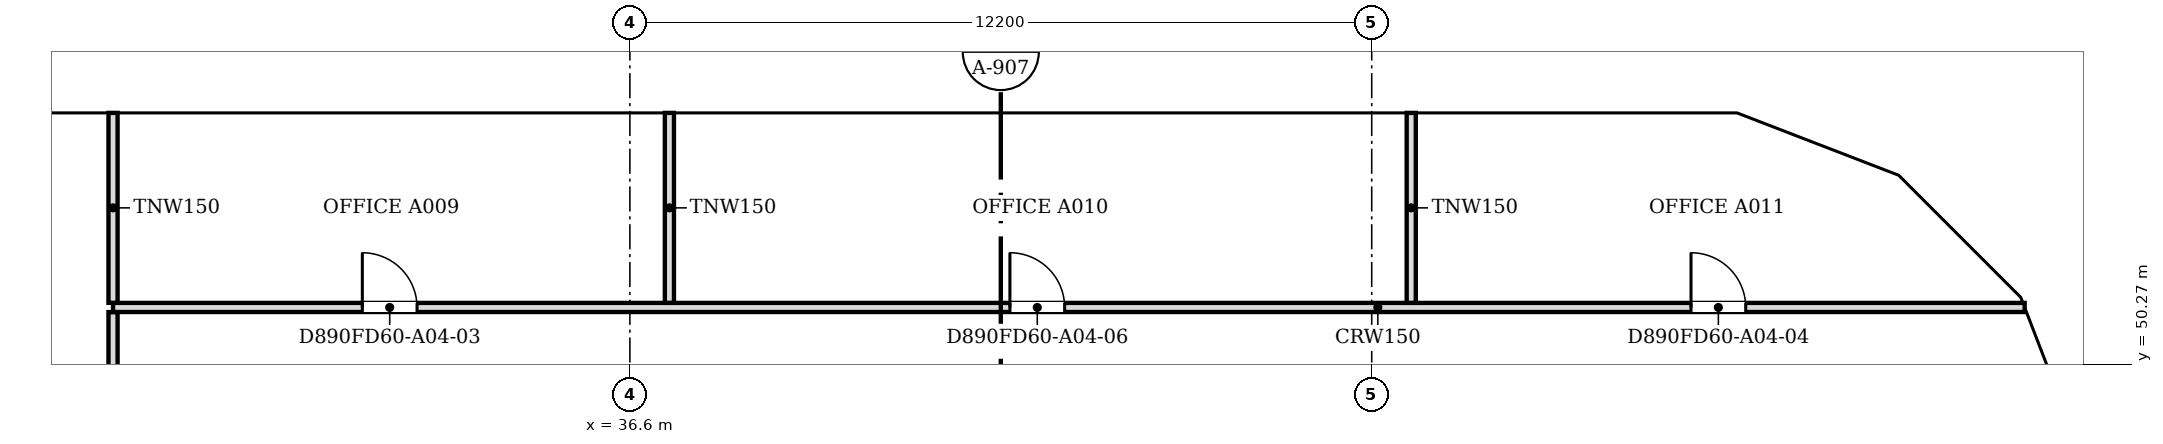
"""IFC4 building model, lengths in metres.
Left out: names, types, materials, properties, quantities, classifications, styles, units other than length and angle.
Written with IfcOpenShell. Run it as: python <this file> out.ifc"""

import sys

from ifc_helpers import new_model, si_unit, direction, frame, frame_2d, origin, place, context, subcontext, project, spatial, polyline, rectangle, outline, extrude, faceted_brep, source, transform, mapped, element, fill, save


model = new_model("IFC4")
c1 = context("Model", 3, precision=1e-05, world=origin(), true_north=direction((0.0, 1.0)))
c2 = subcontext(c1, "Body", "Model", "MODEL_VIEW")
j1 = project(units=[si_unit("LENGTHUNIT", "METRE"), si_unit("PLANEANGLEUNIT", "RADIAN")], contexts=[c1])
p1 = place(None, origin())
s1 = spatial("IfcSite", under=j1, at=p1, CompositionType="ELEMENT")
p2 = place(p1, origin())
s2 = spatial("IfcBuilding", under=s1, at=p2, CompositionType="ELEMENT")
p3 = place(p2, frame((0.0, 0.0, 52.4)))
s3 = spatial("IfcBuildingStorey", under=s2, at=p3, CompositionType="ELEMENT", Elevation=52.4)
m1 = source(origin(), c2, "Body", "Brep", [
    faceted_brep([(0.047, -0.25, 0.0), (2.997, -0.25, 3.8), (0.047, -0.25, 7.6), (0.0, -0.25, 7.541), (0.0, -0.25, 0.059), (0.093, 0.25, 7.54), (2.944, 0.25, 3.868), (2.944, 0.25, 3.732), (0.093, 0.25, 0.06), (2.997, 0.0, 3.8), (0.047, 0.0, 0.0), (0.047, 0.0, 7.6)], [[[0, 1, 2, 3, 4]], [[5, 6, 7, 8]], [[8, 7, 9, 1, 0, 10]], [[6, 5, 11, 2, 1, 9]], [[3, 2, 11]], [[10, 0, 4]], [[8, 10, 4, 3, 11, 5]], [[9, 7, 6]]]),
])
p4 = place(p3, frame((60.767, 48.71, -3.8), z_axis=(0.0, 0.0, 1.0), x_axis=(-0.359901446078, 0.932990326376, 0.0)))
e1 = element("IfcWall", 1, at=p4, inside=s3, PredefinedType="SOLIDWALL", context=c2, shape_type="MappedRepresentation", body=[
    mapped(m1, transform((0.0, 0.0, 0.0), scale=1.0)),
])
m2 = source(origin(), c2, "Body", "SweptSolid", [
    extrude(outline(polyline([(0.247, 0.665), (2.681, 3.8), (0.247, 6.935), (0.247, 0.665)])), frame((0.0, 0.26, 0.0), z_axis=(0.0, -1.0, 0.0), x_axis=(1.0, 0.0, 0.0)), (0.0, 0.0, 1.0), 0.52),
])
p5 = place(p4, origin())
e2 = element("IfcOpeningElement", 2, at=p5, cuts=e1, PredefinedType="OPENING", context=c2, shape_type="MappedRepresentation", body=[
    mapped(m2, transform((0.0, 0.0, 0.0), scale=1.0)),
])
m3 = source(origin(), c2, "Body", "Brep", [
    faceted_brep([(2.944, -0.25, 0.0), (2.997, -0.25, 0.068), (2.997, -0.25, 7.532), (2.944, -0.25, 7.6), (0.0, -0.25, 3.8), (0.053, 0.25, 3.868), (2.891, 0.25, 7.532), (2.891, 0.25, 0.068), (0.053, 0.25, 3.731), (2.944, 0.0, 0.0), (2.944, 0.0, 7.6), (0.0, 0.0, 3.8)], [[[0, 1, 2, 3, 4]], [[5, 6, 7, 8]], [[1, 0, 9]], [[10, 3, 2]], [[6, 5, 11, 4, 3, 10]], [[8, 7, 9, 0, 4, 11]], [[8, 11, 5]], [[1, 9, 7, 6, 10, 2]]]),
])
p6 = place(p3, frame((59.688, 51.506, -3.8), z_axis=(0.0, 0.0, 1.0), x_axis=(-0.707106781187, 0.707106781187, 0.0)))
e3 = element("IfcWall", 3, at=p6, inside=s3, PredefinedType="SOLIDWALL", context=c2, shape_type="MappedRepresentation", body=[
    mapped(m3, transform((0.0, 0.0, 0.0), scale=1.0)),
])
m4 = source(origin(), c2, "Body", "SweptSolid", [
    extrude(outline(polyline([(2.744, 6.934), (0.316, 3.8), (2.744, 0.666), (2.744, 6.934)])), frame((0.0, 0.26, 0.0), z_axis=(0.0, -1.0, 0.0), x_axis=(1.0, 0.0, 0.0)), (0.0, 0.0, 1.0), 0.52),
])
p7 = place(p6, origin())
e4 = element("IfcOpeningElement", 4, at=p7, cuts=e3, PredefinedType="OPENING", context=c2, shape_type="MappedRepresentation", body=[
    mapped(m4, transform((0.0, 0.0, 0.0), scale=1.0)),
])
m5 = source(origin(), c2, "Body", "Brep", [
    faceted_brep([(0.053, -0.25, 0.0), (3.003, -0.25, 3.8), (0.053, -0.25, 7.6), (0.0, -0.25, 7.531), (0.0, -0.25, 0.068), (0.106, 0.25, 7.532), (2.957, 0.25, 3.86), (2.957, 0.25, 3.74), (0.106, 0.25, 0.068), (3.003, 0.0, 3.8), (0.053, 0.0, 0.0), (0.053, 0.0, 7.6)], [[[0, 1, 2, 3, 4]], [[5, 6, 7, 8]], [[8, 7, 9, 1, 0, 10]], [[6, 5, 11, 2, 1, 9]], [[3, 2, 11]], [[10, 0, 4]], [[8, 10, 4, 3, 11, 5]], [[9, 7, 6]]]),
])
p8 = place(p3, frame((57.656, 53.569, -3.8), z_axis=(0.0, 0.0, 1.0), x_axis=(-0.933007896601, 0.359855894603, 0.0)))
e5 = element("IfcWall", 5, at=p8, inside=s3, PredefinedType="SOLIDWALL", context=c2, shape_type="MappedRepresentation", body=[
    mapped(m5, transform((0.0, 0.0, 0.0), scale=1.0)),
])
m6 = source(origin(), c2, "Body", "SweptSolid", [
    extrude(outline(polyline([(0.253, 0.665), (2.687, 3.8), (0.253, 6.935), (0.253, 0.665)])), frame((0.0, 0.26, 0.0), z_axis=(0.0, -1.0, 0.0), x_axis=(1.0, 0.0, 0.0)), (0.0, 0.0, 1.0), 0.52),
])
p9 = place(p8, origin())
e6 = element("IfcOpeningElement", 6, at=p9, cuts=e5, PredefinedType="OPENING", context=c2, shape_type="MappedRepresentation", body=[
    mapped(m6, transform((0.0, 0.0, 0.0), scale=1.0)),
])
m7 = source(origin(), c2, "Body", "Brep", [
    faceted_brep([(3.003, -0.25, 0.0), (6.053, -0.25, 3.8), (3.003, -0.25, 7.6), (0.0, -0.25, 3.8), (0.047, 0.25, 3.859), (3.003, 0.25, 7.6), (6.053, 0.25, 3.8), (3.003, 0.25, 0.0), (0.047, 0.25, 3.741), (0.0, 0.0, 3.8)], [[[0, 1, 2, 3]], [[4, 5, 6, 7, 8]], [[7, 6, 1, 0]], [[6, 5, 2, 1]], [[5, 4, 9, 3, 2]], [[8, 7, 0, 3, 9]], [[8, 9, 4]]]),
])
p10 = place(p3, frame((54.854, 54.65, -3.8), z_axis=(0.0, 0.0, 1.0), x_axis=(-1.0, 0.0, 0.0)))
e7 = element("IfcWall", 7, at=p10, inside=s3, PredefinedType="SOLIDWALL", context=c2, shape_type="MappedRepresentation", body=[
    mapped(m7, transform((0.0, 0.0, 0.0), scale=1.0)),
])
m8 = source(origin(), c2, "Body", "SweptSolid", [
    extrude(outline(polyline([(3.005, 0.401), (5.733, 3.8), (3.005, 7.199), (0.319, 3.8), (3.005, 0.401)])), frame((0.0, 0.26, 0.0), z_axis=(0.0, -1.0, 0.0), x_axis=(1.0, 0.0, 0.0)), (0.0, 0.0, 1.0), 0.52),
])
p11 = place(p10, origin())
e8 = element("IfcOpeningElement", 8, at=p11, cuts=e7, PredefinedType="OPENING", context=c2, shape_type="MappedRepresentation", body=[
    mapped(m8, transform((0.0, 0.0, 0.0), scale=1.0)),
])
m9 = source(origin(), c2, "Body", "SweptSolid", [
    extrude(outline(polyline([(3.05, 0.0), (6.1, 3.8), (3.05, 7.6), (0.0, 3.8), (3.05, 0.0)])), frame((0.0, 0.25, 0.0), z_axis=(0.0, -1.0, 0.0), x_axis=(1.0, 0.0, 0.0)), (0.0, 0.0, 1.0), 0.5),
])
p12 = place(p3, frame((48.8, 54.65, -3.8), z_axis=(0.0, 0.0, 1.0), x_axis=(-1.0, 0.0, 0.0)))
e9 = element("IfcWall", 9, at=p12, inside=s3, PredefinedType="SOLIDWALL", context=c2, shape_type="MappedRepresentation", body=[
    mapped(m9, transform((0.0, 0.0, 0.0), scale=1.0)),
])
m10 = source(origin(), c2, "Body", "SweptSolid", [
    extrude(outline(polyline([(3.05, 0.399), (5.78, 3.8), (3.05, 7.2), (0.321, 3.8), (3.05, 0.399)])), frame((0.0, 0.26, 0.0), z_axis=(0.0, -1.0, 0.0), x_axis=(1.0, 0.0, 0.0)), (0.0, 0.0, 1.0), 0.52),
])
p13 = place(p12, origin())
e10 = element("IfcOpeningElement", 10, at=p13, cuts=e9, PredefinedType="OPENING", context=c2, shape_type="MappedRepresentation", body=[
    mapped(m10, transform((0.0, 0.0, 0.0), scale=1.0)),
])
m11 = source(origin(), c2, "Body", "Brep", [
    faceted_brep([(3.05, -0.25, 0.0), (6.1, -0.25, 3.8), (6.1, -0.25, 3.8), (3.05, -0.25, 7.6), (0.0, -0.25, 3.8), (0.0, 0.25, 3.8), (3.05, 0.25, 7.6), (6.1, 0.25, 3.8), (6.1, 0.25, 3.8), (3.05, 0.25, 0.0)], [[[0, 1, 2, 3, 4]], [[5, 6, 7, 8, 9]], [[9, 8, 1, 0]], [[7, 6, 3, 2]], [[6, 5, 4, 3]], [[5, 9, 0, 4]], [[1, 8, 7, 2]]]),
])
p14 = place(p3, frame((42.7, 54.65, -3.8), z_axis=(0.0, 0.0, 1.0), x_axis=(-1.0, 0.0, 0.0)))
e11 = element("IfcWall", 11, at=p14, inside=s3, PredefinedType="SOLIDWALL", context=c2, shape_type="MappedRepresentation", body=[
    mapped(m11, transform((0.0, 0.0, 0.0), scale=1.0)),
])
p15 = place(p14, origin())
e12 = element("IfcOpeningElement", 12, at=p15, cuts=e11, PredefinedType="OPENING", context=c2, shape_type="MappedRepresentation", body=[
    mapped(m10, transform((0.0, 0.0, 0.0), scale=1.0)),
])
p16 = place(p3, frame((36.6, 54.65, -3.8), z_axis=(0.0, 0.0, 1.0), x_axis=(-1.0, 0.0, 0.0)))
e13 = element("IfcWall", 13, at=p16, inside=s3, PredefinedType="SOLIDWALL", context=c2, shape_type="MappedRepresentation", body=[
    mapped(m9, transform((0.0, 0.0, 0.0), scale=1.0)),
])
p17 = place(p16, origin())
e14 = element("IfcOpeningElement", 14, at=p17, cuts=e13, PredefinedType="OPENING", context=c2, shape_type="MappedRepresentation", body=[
    mapped(m10, transform((0.0, 0.0, 0.0), scale=1.0)),
])
p18 = place(p3, frame((30.5, 54.65, -3.8), z_axis=(0.0, 0.0, 1.0), x_axis=(-1.0, 0.0, 0.0)))
e15 = element("IfcWall", 15, at=p18, inside=s3, PredefinedType="SOLIDWALL", context=c2, shape_type="MappedRepresentation", body=[
    mapped(m9, transform((0.0, 0.0, 0.0), scale=1.0)),
])
p19 = place(p18, origin())
e16 = element("IfcOpeningElement", 16, at=p19, cuts=e15, PredefinedType="OPENING", context=c2, shape_type="MappedRepresentation", body=[
    mapped(m10, transform((0.0, 0.0, 0.0), scale=1.0)),
])
p20 = place(p2, frame((0.0, 0.0, 56.2)))
s4 = spatial("IfcBuildingStorey", under=s2, at=p20, CompositionType="ELEMENT", Elevation=56.2)
m12 = source(origin(), c2, "Body", "Brep", [
    faceted_brep([(2.95, -0.25, 0.0), (3.003, -0.25, 0.068), (3.003, -0.25, 7.532), (2.95, -0.25, 7.6), (0.0, -0.25, 3.8), (0.047, 0.25, 3.86), (2.898, 0.25, 7.532), (2.898, 0.25, 0.068), (0.047, 0.25, 3.74), (2.95, 0.0, 0.0), (2.95, 0.0, 7.6), (0.0, 0.0, 3.8)], [[[0, 1, 2, 3, 4]], [[5, 6, 7, 8]], [[1, 0, 9]], [[10, 3, 2]], [[6, 5, 11, 4, 3, 10]], [[8, 7, 9, 0, 4, 11]], [[8, 11, 5]], [[1, 9, 7, 6, 10, 2]]]),
])
p21 = place(p20, frame((60.75, 48.753, -3.8), z_axis=(0.0, 0.0, 1.0), x_axis=(-0.35992665181, 0.932980602862, 0.0)))
e17 = element("IfcWall", 17, at=p21, inside=s4, PredefinedType="SOLIDWALL", context=c2, shape_type="MappedRepresentation", body=[
    mapped(m12, transform((0.0, 0.0, 0.0), scale=1.0)),
])
m13 = source(origin(), c2, "Body", "SweptSolid", [
    extrude(outline(polyline([(2.75, 6.935), (0.316, 3.8), (2.75, 0.665), (2.75, 6.935)])), frame((0.0, 0.26, 0.0), z_axis=(0.0, -1.0, 0.0), x_axis=(1.0, 0.0, 0.0)), (0.0, 0.0, 1.0), 0.52),
])
p22 = place(p21, origin())
e18 = element("IfcOpeningElement", 18, at=p22, cuts=e17, PredefinedType="OPENING", context=c2, shape_type="MappedRepresentation", body=[
    mapped(m13, transform((0.0, 0.0, 0.0), scale=1.0)),
])
m14 = source(origin(), c2, "Body", "Brep", [
    faceted_brep([(0.053, -0.25, 0.0), (2.997, -0.25, 3.8), (0.053, -0.25, 7.6), (0.0, -0.25, 7.532), (0.0, -0.25, 0.068), (0.106, 0.25, 7.532), (2.944, 0.25, 3.868), (2.944, 0.25, 3.732), (0.106, 0.25, 0.068), (2.997, 0.0, 3.8), (0.053, 0.0, 0.0), (0.053, 0.0, 7.6)], [[[0, 1, 2, 3, 4]], [[5, 6, 7, 8]], [[8, 7, 9, 1, 0, 10]], [[6, 5, 11, 2, 1, 9]], [[3, 2, 11]], [[10, 0, 4]], [[8, 10, 4, 3, 11, 5]], [[9, 7, 6]]]),
])
p23 = place(p20, frame((59.726, 51.469, -3.8), z_axis=(0.0, 0.0, 1.0), x_axis=(-0.707106781187, 0.707106781187, 0.0)))
e19 = element("IfcWall", 19, at=p23, inside=s4, PredefinedType="SOLIDWALL", context=c2, shape_type="MappedRepresentation", body=[
    mapped(m14, transform((0.0, 0.0, 0.0), scale=1.0)),
])
m15 = source(origin(), c2, "Body", "SweptSolid", [
    extrude(outline(polyline([(0.253, 0.667), (2.681, 3.8), (0.253, 6.934), (0.253, 0.667)])), frame((0.0, 0.26, 0.0), z_axis=(0.0, -1.0, 0.0), x_axis=(1.0, 0.0, 0.0)), (0.0, 0.0, 1.0), 0.52),
])
p24 = place(p23, origin())
e20 = element("IfcOpeningElement", 20, at=p24, cuts=e19, PredefinedType="OPENING", context=c2, shape_type="MappedRepresentation", body=[
    mapped(m15, transform((0.0, 0.0, 0.0), scale=1.0)),
])
m16 = source(origin(), c2, "Body", "Brep", [
    faceted_brep([(2.95, -0.25, 0.0), (2.997, -0.25, 0.059), (2.997, -0.25, 7.541), (2.95, -0.25, 7.6), (0.0, -0.25, 3.8), (0.053, 0.25, 3.868), (2.904, 0.25, 7.54), (2.904, 0.25, 0.06), (0.053, 0.25, 3.732), (2.95, 0.0, 0.0), (2.95, 0.0, 7.6), (0.0, 0.0, 3.8)], [[[0, 1, 2, 3, 4]], [[5, 6, 7, 8]], [[1, 0, 9]], [[10, 3, 2]], [[6, 5, 11, 4, 3, 10]], [[8, 7, 9, 0, 4, 11]], [[8, 11, 5]], [[1, 9, 7, 6, 10, 2]]]),
])
p25 = place(p20, frame((57.606, 53.588, -3.8), z_axis=(0.0, 0.0, 1.0), x_axis=(-0.932990326376, 0.359901446078, 0.0)))
e21 = element("IfcWall", 21, at=p25, inside=s4, PredefinedType="SOLIDWALL", context=c2, shape_type="MappedRepresentation", body=[
    mapped(m16, transform((0.0, 0.0, 0.0), scale=1.0)),
])
p26 = place(p25, origin())
e22 = element("IfcOpeningElement", 22, at=p26, cuts=e21, PredefinedType="OPENING", context=c2, shape_type="MappedRepresentation", body=[
    mapped(m13, transform((0.0, 0.0, 0.0), scale=1.0)),
])
m17 = source(origin(), c2, "Body", "Brep", [
    faceted_brep([(0.047, -0.25, 0.0), (3.05, -0.25, 3.8), (0.047, -0.25, 7.6), (0.0, -0.25, 7.54), (0.0, -0.25, 0.06), (0.093, 0.25, 7.541), (3.05, 0.25, 3.8), (0.093, 0.25, 0.059), (0.047, 0.0, 0.0), (0.047, 0.0, 7.6)], [[[0, 1, 2, 3, 4]], [[5, 6, 7]], [[7, 6, 1, 0, 8]], [[6, 5, 9, 2, 1]], [[3, 2, 9]], [[8, 0, 4]], [[7, 8, 4, 3, 9, 5]]]),
])
p27 = place(p20, frame((54.9, 54.65, -3.8), z_axis=(0.0, 0.0, 1.0), x_axis=(-1.0, 0.0, 0.0)))
e23 = element("IfcWall", 23, at=p27, inside=s4, PredefinedType="SOLIDWALL", context=c2, shape_type="MappedRepresentation", body=[
    mapped(m17, transform((0.0, 0.0, 0.0), scale=1.0)),
])
m18 = source(origin(), c2, "Body", "SweptSolid", [
    extrude(outline(polyline([(0.247, 0.656), (2.731, 3.8), (0.247, 6.944), (0.247, 0.656)])), frame((0.0, 0.26, 0.0), z_axis=(0.0, -1.0, 0.0), x_axis=(1.0, 0.0, 0.0)), (0.0, 0.0, 1.0), 0.52),
])
p28 = place(p27, origin())
e24 = element("IfcOpeningElement", 24, at=p28, cuts=e23, PredefinedType="OPENING", context=c2, shape_type="MappedRepresentation", body=[
    mapped(m18, transform((0.0, 0.0, 0.0), scale=1.0)),
])
m19 = source(origin(), c2, "Body", "SweptSolid", [
    extrude(outline(polyline([(3.05, 0.0), (6.1, 3.8), (3.05, 7.6), (0.0, 3.8), (3.05, 0.0)])), frame((0.0, 0.25, 0.0), z_axis=(0.0, -1.0, 0.0), x_axis=(1.0, 0.0, 0.0)), (0.0, 0.0, 1.0), 0.5),
])
p29 = place(p20, frame((51.85, 54.65, -3.8), z_axis=(0.0, 0.0, 1.0), x_axis=(-1.0, 0.0, 0.0)))
e25 = element("IfcWall", 25, at=p29, inside=s4, PredefinedType="SOLIDWALL", context=c2, shape_type="MappedRepresentation", body=[
    mapped(m19, transform((0.0, 0.0, 0.0), scale=1.0)),
])
m20 = source(origin(), c2, "Body", "SweptSolid", [
    extrude(outline(polyline([(3.05, 0.399), (5.78, 3.8), (3.05, 7.201), (0.321, 3.8), (3.05, 0.399)])), frame((0.0, 0.26, 0.0), z_axis=(0.0, -1.0, 0.0), x_axis=(1.0, 0.0, 0.0)), (0.0, 0.0, 1.0), 0.52),
])
p30 = place(p29, origin())
e26 = element("IfcOpeningElement", 26, at=p30, cuts=e25, PredefinedType="OPENING", context=c2, shape_type="MappedRepresentation", body=[
    mapped(m20, transform((0.0, 0.0, 0.0), scale=1.0)),
])
p31 = place(p20, frame((45.75, 54.65, -3.8), z_axis=(0.0, 0.0, 1.0), x_axis=(-1.0, 0.0, 0.0)))
e27 = element("IfcWall", 27, at=p31, inside=s4, PredefinedType="SOLIDWALL", context=c2, shape_type="MappedRepresentation", body=[
    mapped(m19, transform((0.0, 0.0, 0.0), scale=1.0)),
])
p32 = place(p31, origin())
e28 = element("IfcOpeningElement", 28, at=p32, cuts=e27, PredefinedType="OPENING", context=c2, shape_type="MappedRepresentation", body=[
    mapped(m20, transform((0.0, 0.0, 0.0), scale=1.0)),
])
m21 = source(origin(), c2, "Body", "Brep", [
    faceted_brep([(3.05, -0.25, 0.0), (6.1, -0.25, 3.8), (6.1, -0.25, 3.8), (3.05, -0.25, 7.6), (0.0, -0.25, 3.8), (0.0, 0.25, 3.8), (3.05, 0.25, 7.6), (6.1, 0.25, 3.8), (6.1, 0.25, 3.8), (3.05, 0.25, 0.0)], [[[0, 1, 2, 3, 4]], [[5, 6, 7, 8, 9]], [[9, 8, 1, 0]], [[7, 6, 3, 2]], [[6, 5, 4, 3]], [[5, 9, 0, 4]], [[1, 8, 7, 2]]]),
])
p33 = place(p20, frame((39.65, 54.65, -3.8), z_axis=(0.0, 0.0, 1.0), x_axis=(-1.0, 0.0, 0.0)))
e29 = element("IfcWall", 29, at=p33, inside=s4, PredefinedType="SOLIDWALL", context=c2, shape_type="MappedRepresentation", body=[
    mapped(m21, transform((0.0, 0.0, 0.0), scale=1.0)),
])
p34 = place(p33, origin())
e30 = element("IfcOpeningElement", 30, at=p34, cuts=e29, PredefinedType="OPENING", context=c2, shape_type="MappedRepresentation", body=[
    mapped(m20, transform((0.0, 0.0, 0.0), scale=1.0)),
])
p35 = place(p20, frame((33.55, 54.65, -3.8), z_axis=(0.0, 0.0, 1.0), x_axis=(-1.0, 0.0, 0.0)))
e31 = element("IfcWall", 31, at=p35, inside=s4, PredefinedType="SOLIDWALL", context=c2, shape_type="MappedRepresentation", body=[
    mapped(m19, transform((0.0, 0.0, 0.0), scale=1.0)),
])
p36 = place(p35, origin())
e32 = element("IfcOpeningElement", 32, at=p36, cuts=e31, PredefinedType="OPENING", context=c2, shape_type="MappedRepresentation", body=[
    mapped(m20, transform((0.0, 0.0, 0.0), scale=1.0)),
])
p37 = place(p20, frame((27.45, 54.65, -3.8), z_axis=(0.0, 0.0, 1.0), x_axis=(-1.0, 0.0, 0.0)))
e33 = element("IfcWall", 33, at=p37, inside=s4, PredefinedType="SOLIDWALL", context=c2, shape_type="MappedRepresentation", body=[
    mapped(m21, transform((0.0, 0.0, 0.0), scale=1.0)),
])
p38 = place(p37, origin())
e34 = element("IfcOpeningElement", 34, at=p38, cuts=e33, PredefinedType="OPENING", context=c2, shape_type="MappedRepresentation", body=[
    mapped(m20, transform((0.0, 0.0, 0.0), scale=1.0)),
])
p39 = place(p3, frame((28.1, 47.376, 0.0), z_axis=(0.0, 0.0, 1.0), x_axis=(0.0, 1.0, 0.0)))
e35 = element("IfcWall", 35, at=p39, inside=s3, PredefinedType="PARTITIONING", context=c2, shape_type="SweptSolid", body=[
    extrude(rectangle(XDim=3.748, YDim=0.15, at=frame_2d((1.874, 0.0))), origin(), (0.0, 0.0, 1.0), 3.067),
])
p40 = place(p3, frame((28.1, 51.2, 0.0), z_axis=(0.0, 0.0, 1.0), x_axis=(1.0, 0.0, 0.0)))
e36 = element("IfcWall", 36, at=p40, inside=s3, PredefinedType="PARTITIONING", context=c2, shape_type="SweptSolid", body=[
    extrude(rectangle(XDim=31.438, YDim=0.15, at=frame_2d((15.719, 0.0))), origin(), (0.0, 0.0, 1.0), 3.067),
])
m22 = source(origin(), c2, "Body", "SweptSolid", [
    extrude(rectangle(XDim=0.9, YDim=2.1, at=frame_2d((0.45, 1.05))), frame((0.0, 0.085, 0.0), z_axis=(0.0, -1.0, 0.0), x_axis=(1.0, 0.0, 0.0)), (0.0, 0.0, 1.0), 0.17),
])
p41 = place(p40, frame((4.1, 0.0, 0.0)))
e37 = element("IfcOpeningElement", 37, at=p41, cuts=e36, PredefinedType="OPENING", context=c2, shape_type="MappedRepresentation", body=[
    mapped(m22, transform((0.0, 0.0, 0.0), scale=1.0)),
])
p42 = place(p40, frame((25.951, 0.0, 0.0)))
e38 = element("IfcOpeningElement", 38, at=p42, cuts=e36, PredefinedType="OPENING", context=c2, shape_type="MappedRepresentation", body=[
    mapped(m22, transform((0.0, 0.0, 0.0), scale=1.0)),
])
p43 = place(p40, frame((14.75, 0.0, 0.0)))
e39 = element("IfcOpeningElement", 39, at=p43, cuts=e36, PredefinedType="OPENING", context=c2, shape_type="MappedRepresentation", body=[
    mapped(m22, transform((0.0, 0.0, 0.0), scale=1.0)),
])
for number, where, z_axis, x_axis in (
    (40, (28.1, 51.276, 0.0), (0.0, 0.0, 1.0), (0.0, 1.0, 0.0)),
    (41, (37.25, 51.276, 0.0), (0.0, 0.0, 1.0), (0.0, 1.0, 0.0)),
    (42, (49.45, 51.276, 0.0), (0.0, 0.0, 1.0), (0.0, 1.0, 0.0)),
):
    element("IfcWall", number, at=place(p3, frame(where, z_axis=z_axis, x_axis=x_axis)), inside=s3, PredefinedType="PARTITIONING", context=c2, shape_type="SweptSolid", body=[
        extrude(rectangle(XDim=3.124, YDim=0.15, at=frame_2d((1.562, 0.0))), origin(), (0.0, 0.0, 1.0), 3.067),
    ])
m23 = source(origin(), c2, "Body", "SweptSolid", [
    extrude(rectangle(XDim=0.9, YDim=2.1, at=frame_2d((0.45, 1.05))), frame((0.0, 0.025, 0.0), z_axis=(0.0, -1.0, 0.0), x_axis=(1.0, 0.0, 0.0)), (0.0, 0.0, 1.0), 0.05),
])
p44 = place(p41, origin())
e43 = element("IfcDoor", 43, at=p44, inside=s3, OperationType="SINGLE_SWING_LEFT", PredefinedType="DOOR", context=c2, shape_type="MappedRepresentation", body=[
    mapped(m23, transform((0.0, 0.0, 0.0), scale=1.0)),
])
fill(e37, e43)
p45 = place(p42, origin())
e44 = element("IfcDoor", 44, at=p45, inside=s3, OperationType="SINGLE_SWING_LEFT", PredefinedType="DOOR", context=c2, shape_type="MappedRepresentation", body=[
    mapped(m23, transform((0.0, 0.0, 0.0), scale=1.0)),
])
fill(e38, e44)
p46 = place(p43, origin())
e45 = element("IfcDoor", 45, at=p46, inside=s3, OperationType="SINGLE_SWING_LEFT", PredefinedType="DOOR", context=c2, shape_type="MappedRepresentation", body=[
    mapped(m23, transform((0.0, 0.0, 0.0), scale=1.0)),
])
fill(e39, e45)
save(model, sys.argv[1])
